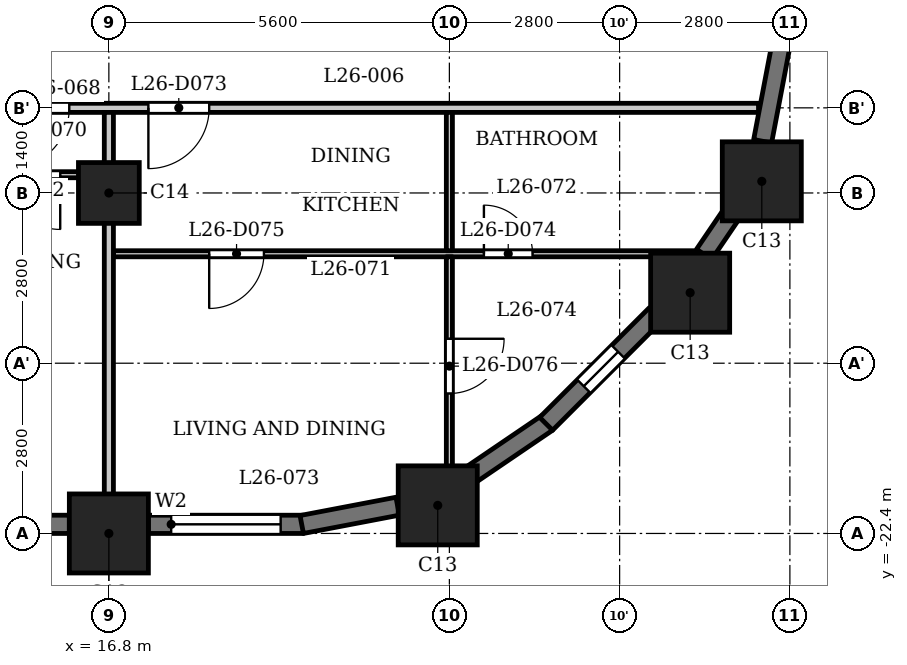
"""IFC4 building model, lengths in metres.
Left out: names, types, materials, properties, quantities, classifications, styles, units other than length and angle.
Written with IfcOpenShell. Run it as: python <this file> out.ifc"""

import sys

from ifc_helpers import new_model, si_unit, direction, frame, frame_2d, origin, origin_2d, place, context, subcontext, project, spatial, rectangle, extrude, element, fill, save


model = new_model("IFC4")
c1 = context("Model", 3, precision=1e-05, world=origin(), true_north=direction((0.0, 1.0)))
c2 = subcontext(c1, "Body", "Model", "MODEL_VIEW")
j1 = project(units=[si_unit("LENGTHUNIT", "METRE"), si_unit("PLANEANGLEUNIT", "RADIAN")], contexts=[c1])
p1 = place(None, origin())
s1 = spatial("IfcSite", under=j1, at=p1, CompositionType="ELEMENT")
p2 = place(p1, origin())
s2 = spatial("IfcBuilding", under=s1, at=p2, CompositionType="ELEMENT")
p3 = place(p2, frame((0.0, 0.0, 104.3)))
s3 = spatial("IfcBuildingStorey", under=s2, at=p3, CompositionType="ELEMENT", Elevation=104.3)
for number, where, z_axis, x_axis in (
    (1, (16.8, -22.4, 0.0), (0.0, 0.0, 1.0), (1.0, 0.0, 0.0)),
    (2, (22.209, -21.938, 0.0), (0.0, 0.0, 1.0), (1.0, 0.0, 0.0)),
    (3, (26.36, -18.44, 0.0), (0.0, 0.0, 1.0), (1.0, 0.0, 0.0)),
    (4, (27.538, -16.609, 0.0), (0.0, 0.0, 1.0), (1.0, 0.0, 0.0)),
):
    element("IfcColumn", number, at=place(p3, frame(where, z_axis=z_axis, x_axis=x_axis)), inside=s3, PredefinedType="COLUMN", context=c2, shape_type="SweptSolid", body=[
        extrude(rectangle(XDim=1.3, YDim=1.3, at=origin_2d()), origin(), (0.0, 0.0, 1.0), 3.5),
    ])
p4 = place(p3, frame((16.8, -16.8, 0.0), z_axis=(0.0, 0.0, 1.0), x_axis=(1.0, 0.0, 0.0)))
e5 = element("IfcColumn", 5, at=p4, inside=s3, PredefinedType="COLUMN", context=c2, shape_type="SweptSolid", body=[
    extrude(rectangle(XDim=1.0, YDim=1.0, at=origin_2d()), origin(), (0.0, 0.0, 1.0), 3.5),
])
p5 = place(p3, frame((11.85, -22.25, 0.0), z_axis=(0.0, 0.0, 1.0), x_axis=(1.0, 0.0, 0.0)))
e6 = element("IfcWall", 6, at=p5, inside=s3, PredefinedType="SOLIDWALL", context=c2, shape_type="SweptSolid", body=[
    extrude(rectangle(XDim=4.3, YDim=0.3, at=frame_2d((2.15, 0.0))), origin(), (0.0, 0.0, 1.0), 2.4),
])
p6 = place(p5, frame((0.35, 0.0, 1.2)))
e7 = element("IfcOpeningElement", 7, at=p6, cuts=e6, PredefinedType="OPENING", context=c2, shape_type="SweptSolid", body=[
    extrude(rectangle(XDim=3.6, YDim=0.95, at=frame_2d((1.8, 0.475))), frame((0.0, 0.16, 0.0), z_axis=(0.0, -1.0, 0.0), x_axis=(1.0, 0.0, 0.0)), (0.0, 0.0, 1.0), 0.32),
])
p7 = place(p3, frame((17.45, -22.25, 0.0), z_axis=(0.0, 0.0, 1.0), x_axis=(1.0, 0.0, 0.0)))
e8 = element("IfcWall", 8, at=p7, inside=s3, PredefinedType="SOLIDWALL", context=c2, shape_type="SweptSolid", body=[
    extrude(rectangle(XDim=2.55, YDim=0.3, at=frame_2d((1.275, 0.0))), origin(), (0.0, 0.0, 1.0), 2.4),
])
p8 = place(p7, frame((0.375, 0.0, 0.9)))
e9 = element("IfcOpeningElement", 9, at=p8, cuts=e8, PredefinedType="OPENING", context=c2, shape_type="SweptSolid", body=[
    extrude(rectangle(XDim=1.8, YDim=1.25, at=frame_2d((0.9, 0.625))), frame((0.0, 0.16, 0.0), z_axis=(0.0, -1.0, 0.0), x_axis=(1.0, 0.0, 0.0)), (0.0, 0.0, 1.0), 0.32),
])
for number, where, z_axis, x_axis in (
    (10, (19.972, -22.253, 0.0), (0.0, 0.0, 1.0), (0.982, 0.187, 0.0)),
    (11, (22.684, -21.482, 0.0), (0.0, 0.0, 1.0), (0.827, 0.562, 0.0)),
):
    element("IfcWall", number, at=place(p3, frame(where, z_axis=z_axis, x_axis=x_axis)), inside=s3, PredefinedType="SOLIDWALL", context=c2, shape_type="SweptSolid", body=[
        extrude(rectangle(XDim=1.606, YDim=0.3, at=frame_2d((0.803, 0.0))), origin(), (0.0, 0.0, 1.0), 2.4),
    ])
p9 = place(p3, frame((23.991, -20.597, 0.0), z_axis=(0.0, 0.0, 1.0), x_axis=(0.707106781187, 0.707106781187, 0.0)))
e12 = element("IfcWall", 12, at=p9, inside=s3, PredefinedType="SOLIDWALL", context=c2, shape_type="SweptSolid", body=[
    extrude(rectangle(XDim=2.55, YDim=0.3, at=frame_2d((1.275, 0.0))), origin(), (0.0, 0.0, 1.0), 2.4),
])
p10 = place(p9, frame((0.875, 0.0, 0.6)))
e13 = element("IfcOpeningElement", 13, at=p10, cuts=e12, PredefinedType="OPENING", context=c2, shape_type="SweptSolid", body=[
    extrude(rectangle(XDim=0.8, YDim=1.55, at=frame_2d((0.4, 0.775))), frame((0.0, 0.16, 0.0), z_axis=(0.0, -1.0, 0.0), x_axis=(1.0, 0.0, 0.0)), (0.0, 0.0, 1.0), 0.32),
])
p11 = place(p3, frame((26.589, -17.81, 0.0), z_axis=(0.0, 0.0, 1.0), x_axis=(0.562066330934, 0.827092159091, 0.0)))
e14 = element("IfcWall", 14, at=p11, inside=s3, PredefinedType="SOLIDWALL", context=c2, shape_type="SweptSolid", body=[
    extrude(rectangle(XDim=0.877, YDim=0.3, at=frame_2d((0.438, 0.0))), origin(), (0.0, 0.0, 1.0), 3.2),
])
p12 = place(p3, frame((27.552, -15.949, 0.0), z_axis=(0.0, 0.0, 1.0), x_axis=(0.187279751651, 0.982306619453, 0.0)))
e15 = element("IfcWall", 15, at=p12, inside=s3, PredefinedType="SOLIDWALL", context=c2, shape_type="SweptSolid", body=[
    extrude(rectangle(XDim=1.606, YDim=0.3, at=frame_2d((0.803, 0.0))), origin(), (0.0, 0.0, 1.0), 2.4),
])
p13 = place(p3, frame((16.875, -17.8, 0.0), z_axis=(0.0, 0.0, 1.0), x_axis=(1.0, 0.0, 0.0)))
e16 = element("IfcWall", 16, at=p13, inside=s3, PredefinedType="PARTITIONING", context=c2, shape_type="SweptSolid", body=[
    extrude(rectangle(XDim=9.679, YDim=0.1, at=frame_2d((4.84, 0.0))), origin(), (0.0, 0.0, 1.0), 3.2),
])
p14 = place(p13, frame((6.093, 0.0, 0.0)))
e17 = element("IfcOpeningElement", 17, at=p14, cuts=e16, PredefinedType="OPENING", context=c2, shape_type="SweptSolid", body=[
    extrude(rectangle(XDim=0.8, YDim=2.1, at=frame_2d((0.4, 1.05))), frame((0.0, 0.06, 0.0), z_axis=(0.0, -1.0, 0.0), x_axis=(1.0, 0.0, 0.0)), (0.0, 0.0, 1.0), 0.12),
])
p15 = place(p13, frame((1.575, 0.0, 0.0)))
e18 = element("IfcOpeningElement", 18, at=p15, cuts=e16, PredefinedType="OPENING", context=c2, shape_type="SweptSolid", body=[
    extrude(rectangle(XDim=0.9, YDim=2.1, at=frame_2d((0.45, 1.05))), frame((0.0, 0.06, 0.0), z_axis=(0.0, -1.0, 0.0), x_axis=(1.0, 0.0, 0.0)), (0.0, 0.0, 1.0), 0.12),
])
p16 = place(p3, frame((-16.725, -16.5, 0.0), z_axis=(0.0, 0.0, 1.0), x_axis=(1.0, 0.0, 0.0)))
e19 = element("IfcWall", 19, at=p16, inside=s3, PredefinedType="PARTITIONING", context=c2, shape_type="SweptSolid", body=[
    extrude(rectangle(XDim=33.45, YDim=0.1, at=frame_2d((16.725, 0.0))), origin(), (0.0, 0.0, 1.0), 3.2),
])
p17 = place(p16, frame((4.075, 0.0, 0.0)))
e20 = element("IfcOpeningElement", 20, at=p17, cuts=e19, PredefinedType="OPENING", context=c2, shape_type="SweptSolid", body=[
    extrude(rectangle(XDim=0.8, YDim=2.1, at=frame_2d((0.4, 1.05))), frame((0.0, 0.06, 0.0), z_axis=(0.0, -1.0, 0.0), x_axis=(1.0, 0.0, 0.0)), (0.0, 0.0, 1.0), 0.12),
])
p18 = place(p16, frame((1.075, 0.0, 0.0)))
e21 = element("IfcOpeningElement", 21, at=p18, cuts=e19, PredefinedType="OPENING", context=c2, shape_type="SweptSolid", body=[
    extrude(rectangle(XDim=0.9, YDim=2.1, at=frame_2d((0.45, 1.05))), frame((0.0, 0.06, 0.0), z_axis=(0.0, -1.0, 0.0), x_axis=(1.0, 0.0, 0.0)), (0.0, 0.0, 1.0), 0.12),
])
p19 = place(p16, frame((9.675, 0.0, 0.0)))
e22 = element("IfcOpeningElement", 22, at=p19, cuts=e19, PredefinedType="OPENING", context=c2, shape_type="SweptSolid", body=[
    extrude(rectangle(XDim=0.8, YDim=2.1, at=frame_2d((0.4, 1.05))), frame((0.0, 0.06, 0.0), z_axis=(0.0, -1.0, 0.0), x_axis=(1.0, 0.0, 0.0)), (0.0, 0.0, 1.0), 0.12),
])
p20 = place(p16, frame((7.675, 0.0, 0.0)))
e23 = element("IfcOpeningElement", 23, at=p20, cuts=e19, PredefinedType="OPENING", context=c2, shape_type="SweptSolid", body=[
    extrude(rectangle(XDim=0.9, YDim=2.1, at=frame_2d((0.45, 1.05))), frame((0.0, 0.06, 0.0), z_axis=(0.0, -1.0, 0.0), x_axis=(1.0, 0.0, 0.0)), (0.0, 0.0, 1.0), 0.12),
])
p21 = place(p16, frame((15.275, 0.0, 0.0)))
e24 = element("IfcOpeningElement", 24, at=p21, cuts=e19, PredefinedType="OPENING", context=c2, shape_type="SweptSolid", body=[
    extrude(rectangle(XDim=0.8, YDim=2.1, at=frame_2d((0.4, 1.05))), frame((0.0, 0.06, 0.0), z_axis=(0.0, -1.0, 0.0), x_axis=(1.0, 0.0, 0.0)), (0.0, 0.0, 1.0), 0.12),
])
p22 = place(p16, frame((11.775, 0.0, 0.0)))
e25 = element("IfcOpeningElement", 25, at=p22, cuts=e19, PredefinedType="OPENING", context=c2, shape_type="SweptSolid", body=[
    extrude(rectangle(XDim=0.9, YDim=2.1, at=frame_2d((0.45, 1.05))), frame((0.0, 0.06, 0.0), z_axis=(0.0, -1.0, 0.0), x_axis=(1.0, 0.0, 0.0)), (0.0, 0.0, 1.0), 0.12),
])
p23 = place(p16, frame((20.625, 0.0, 0.0)))
e26 = element("IfcOpeningElement", 26, at=p23, cuts=e19, PredefinedType="OPENING", context=c2, shape_type="SweptSolid", body=[
    extrude(rectangle(XDim=0.8, YDim=2.1, at=frame_2d((0.4, 1.05))), frame((0.0, 0.06, 0.0), z_axis=(0.0, -1.0, 0.0), x_axis=(1.0, 0.0, 0.0)), (0.0, 0.0, 1.0), 0.12),
])
p24 = place(p16, frame((18.375, 0.0, 0.0)))
e27 = element("IfcOpeningElement", 27, at=p24, cuts=e19, PredefinedType="OPENING", context=c2, shape_type="SweptSolid", body=[
    extrude(rectangle(XDim=0.9, YDim=2.1, at=frame_2d((0.45, 1.05))), frame((0.0, 0.06, 0.0), z_axis=(0.0, -1.0, 0.0), x_axis=(1.0, 0.0, 0.0)), (0.0, 0.0, 1.0), 0.12),
])
p25 = place(p16, frame((26.475, 0.0, 0.0)))
e28 = element("IfcOpeningElement", 28, at=p25, cuts=e19, PredefinedType="OPENING", context=c2, shape_type="SweptSolid", body=[
    extrude(rectangle(XDim=0.8, YDim=2.1, at=frame_2d((0.4, 1.05))), frame((0.0, 0.06, 0.0), z_axis=(0.0, -1.0, 0.0), x_axis=(1.0, 0.0, 0.0)), (0.0, 0.0, 1.0), 0.12),
])
p26 = place(p16, frame((23.225, 0.0, 0.0)))
e29 = element("IfcOpeningElement", 29, at=p26, cuts=e19, PredefinedType="OPENING", context=c2, shape_type="SweptSolid", body=[
    extrude(rectangle(XDim=0.9, YDim=2.1, at=frame_2d((0.45, 1.05))), frame((0.0, 0.06, 0.0), z_axis=(0.0, -1.0, 0.0), x_axis=(1.0, 0.0, 0.0)), (0.0, 0.0, 1.0), 0.12),
])
p27 = place(p16, frame((29.475, 0.0, 0.0)))
e30 = element("IfcOpeningElement", 30, at=p27, cuts=e19, PredefinedType="OPENING", context=c2, shape_type="SweptSolid", body=[
    extrude(rectangle(XDim=0.8, YDim=2.1, at=frame_2d((0.4, 1.05))), frame((0.0, 0.06, 0.0), z_axis=(0.0, -1.0, 0.0), x_axis=(1.0, 0.0, 0.0)), (0.0, 0.0, 1.0), 0.12),
])
p28 = place(p16, frame((31.825, 0.0, 0.0)))
e31 = element("IfcOpeningElement", 31, at=p28, cuts=e19, PredefinedType="OPENING", context=c2, shape_type="SweptSolid", body=[
    extrude(rectangle(XDim=0.9, YDim=2.1, at=frame_2d((0.45, 1.05))), frame((0.0, 0.06, 0.0), z_axis=(0.0, -1.0, 0.0), x_axis=(1.0, 0.0, 0.0)), (0.0, 0.0, 1.0), 0.12),
])
p29 = place(p3, frame((14.925, -15.4, 0.0), z_axis=(0.0, 0.0, 1.0), x_axis=(1.0, 0.0, 0.0)))
e32 = element("IfcWall", 32, at=p29, inside=s3, PredefinedType="PARTITIONING", context=c2, shape_type="SweptSolid", body=[
    extrude(rectangle(XDim=12.559, YDim=0.15, at=frame_2d((6.279, 0.0))), origin(), (0.0, 0.0, 1.0), 3.2),
])
p30 = place(p29, frame((0.224, 0.0, 0.0)))
e33 = element("IfcOpeningElement", 33, at=p30, cuts=e32, PredefinedType="OPENING", context=c2, shape_type="SweptSolid", body=[
    extrude(rectangle(XDim=1.0, YDim=2.1, at=frame_2d((0.5, 1.05))), frame((0.0, 0.085, 0.0), z_axis=(0.0, -1.0, 0.0), x_axis=(1.0, 0.0, 0.0)), (0.0, 0.0, 1.0), 0.17),
])
p31 = place(p29, frame((2.525, 0.0, 0.0)))
e34 = element("IfcOpeningElement", 34, at=p31, cuts=e32, PredefinedType="OPENING", context=c2, shape_type="SweptSolid", body=[
    extrude(rectangle(XDim=1.0, YDim=2.1, at=frame_2d((0.5, 1.05))), frame((0.0, 0.085, 0.0), z_axis=(0.0, -1.0, 0.0), x_axis=(1.0, 0.0, 0.0)), (0.0, 0.0, 1.0), 0.17),
])
p32 = place(p3, frame((16.8, -23.03, 0.0), z_axis=(0.0, 0.0, 1.0), x_axis=(0.0, 1.0, 0.0)))
e35 = element("IfcWall", 35, at=p32, inside=s3, PredefinedType="PARTITIONING", context=c2, shape_type="SweptSolid", body=[
    extrude(rectangle(XDim=7.555, YDim=0.15, at=frame_2d((3.777, 0.0))), origin(), (0.0, 0.0, 1.0), 3.2),
])
p33 = place(p3, frame((22.4, -21.72, 0.0), z_axis=(0.0, 0.0, 1.0), x_axis=(0.0, 1.0, 0.0)))
e36 = element("IfcWall", 36, at=p33, inside=s3, PredefinedType="PARTITIONING", context=c2, shape_type="SweptSolid", body=[
    extrude(rectangle(XDim=3.87, YDim=0.1, at=frame_2d((1.935, 0.0))), origin(), (0.0, 0.0, 1.0), 3.2),
])
p34 = place(p33, frame((1.622, 0.0, 0.0)))
e37 = element("IfcOpeningElement", 37, at=p34, cuts=e36, PredefinedType="OPENING", context=c2, shape_type="SweptSolid", body=[
    extrude(rectangle(XDim=0.9, YDim=2.1, at=frame_2d((0.45, 1.05))), frame((0.0, 0.06, 0.0), z_axis=(0.0, -1.0, 0.0), x_axis=(1.0, 0.0, 0.0)), (0.0, 0.0, 1.0), 0.12),
])
p35 = place(p3, frame((22.4, -17.75, 0.0), z_axis=(0.0, 0.0, 1.0), x_axis=(0.0, 1.0, 0.0)))
e38 = element("IfcWall", 38, at=p35, inside=s3, PredefinedType="PARTITIONING", context=c2, shape_type="SweptSolid", body=[
    extrude(rectangle(XDim=2.275, YDim=0.1, at=frame_2d((1.137, 0.0))), origin(), (0.0, 0.0, 1.0), 3.2),
])
p36 = place(p30, origin())
e39 = element("IfcDoor", 39, at=p36, inside=s3, OperationType="SINGLE_SWING_LEFT", PredefinedType="DOOR", context=c2, shape_type="SweptSolid", body=[
    extrude(rectangle(XDim=1.0, YDim=2.1, at=frame_2d((0.5, 1.05))), frame((0.0, 0.025, 0.0), z_axis=(0.0, -1.0, 0.0), x_axis=(1.0, 0.0, 0.0)), (0.0, 0.0, 1.0), 0.05),
])
fill(e33, e39)
p37 = place(p28, origin())
e40 = element("IfcDoor", 40, at=p37, inside=s3, OperationType="SINGLE_SWING_RIGHT", PredefinedType="DOOR", context=c2, shape_type="SweptSolid", body=[
    extrude(rectangle(XDim=0.9, YDim=2.1, at=frame_2d((0.45, 1.05))), frame((0.0, 0.025, 0.0), z_axis=(0.0, -1.0, 0.0), x_axis=(1.0, 0.0, 0.0)), (0.0, 0.0, 1.0), 0.05),
])
fill(e31, e40)
p38 = place(p31, origin())
e41 = element("IfcDoor", 41, at=p38, inside=s3, OperationType="SINGLE_SWING_LEFT", PredefinedType="DOOR", context=c2, shape_type="SweptSolid", body=[
    extrude(rectangle(XDim=1.0, YDim=2.1, at=frame_2d((0.5, 1.05))), frame((0.0, 0.025, 0.0), z_axis=(0.0, -1.0, 0.0), x_axis=(1.0, 0.0, 0.0)), (0.0, 0.0, 1.0), 0.05),
])
fill(e34, e41)
p39 = place(p14, origin())
e42 = element("IfcDoor", 42, at=p39, inside=s3, OperationType="SINGLE_SWING_RIGHT", PredefinedType="DOOR", context=c2, shape_type="SweptSolid", body=[
    extrude(rectangle(XDim=0.8, YDim=2.1, at=frame_2d((0.4, 1.05))), frame((0.0, 0.025, 0.0), z_axis=(0.0, -1.0, 0.0), x_axis=(1.0, 0.0, 0.0)), (0.0, 0.0, 1.0), 0.05),
])
fill(e17, e42)
p40 = place(p15, origin())
e43 = element("IfcDoor", 43, at=p40, inside=s3, OperationType="SINGLE_SWING_LEFT", PredefinedType="DOOR", context=c2, shape_type="SweptSolid", body=[
    extrude(rectangle(XDim=0.9, YDim=2.1, at=frame_2d((0.45, 1.05))), frame((0.0, 0.025, 0.0), z_axis=(0.0, -1.0, 0.0), x_axis=(1.0, 0.0, 0.0)), (0.0, 0.0, 1.0), 0.05),
])
fill(e18, e43)
p41 = place(p34, origin())
e44 = element("IfcDoor", 44, at=p41, inside=s3, OperationType="SINGLE_SWING_RIGHT", PredefinedType="DOOR", context=c2, shape_type="SweptSolid", body=[
    extrude(rectangle(XDim=0.9, YDim=2.1, at=frame_2d((0.45, 1.05))), frame((0.0, 0.025, 0.0), z_axis=(0.0, -1.0, 0.0), x_axis=(1.0, 0.0, 0.0)), (0.0, 0.0, 1.0), 0.05),
])
fill(e37, e44)
p42 = place(p8, origin())
e45 = element("IfcWindow", 45, at=p42, inside=s3, PartitioningType="SINGLE_PANEL", PredefinedType="WINDOW", context=c2, shape_type="SweptSolid", body=[
    extrude(rectangle(XDim=1.8, YDim=1.25, at=frame_2d((0.9, 0.625))), frame((0.0, 0.03, 0.0), z_axis=(0.0, -1.0, 0.0), x_axis=(1.0, 0.0, 0.0)), (0.0, 0.0, 1.0), 0.06),
])
fill(e9, e45)
p43 = place(p10, origin())
e46 = element("IfcWindow", 46, at=p43, inside=s3, PartitioningType="SINGLE_PANEL", PredefinedType="WINDOW", context=c2, shape_type="SweptSolid", body=[
    extrude(rectangle(XDim=0.8, YDim=1.55, at=frame_2d((0.4, 0.775))), frame((0.0, 0.03, 0.0), z_axis=(0.0, -1.0, 0.0), x_axis=(1.0, 0.0, 0.0)), (0.0, 0.0, 1.0), 0.06),
])
fill(e13, e46)
save(model, sys.argv[1])
